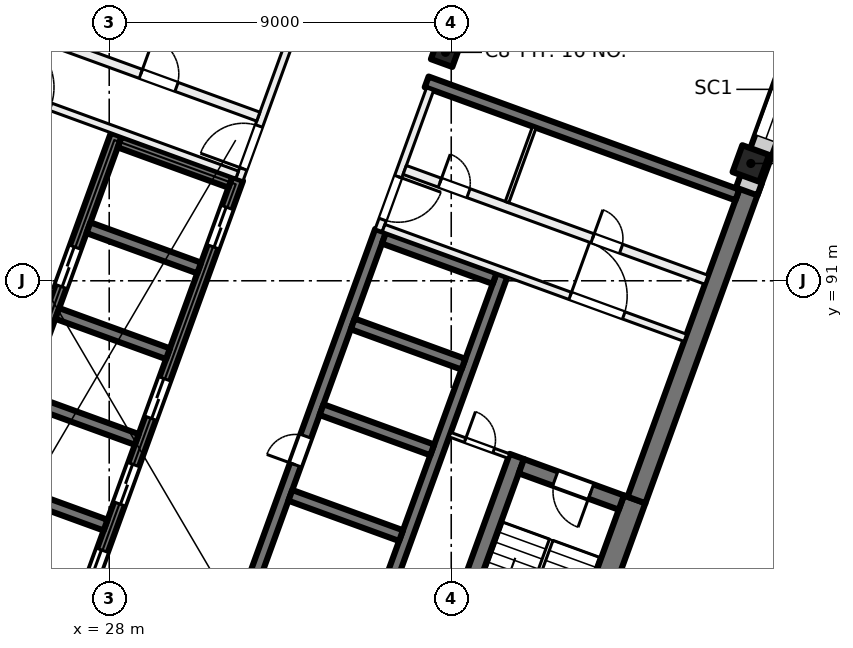
"""IFC4 building model, lengths in metres.
Left out: names, types, materials, properties, quantities, classifications, styles, units other than length and angle.
Written with IfcOpenShell. Run it as: python <this file> out.ifc"""

import sys

from ifc_helpers import new_model, si_unit, direction, frame, frame_2d, origin, origin_2d, place, context, subcontext, project, spatial, rectangle, extrude, element, fill, save


model = new_model("IFC4")
c1 = context("Model", 3, precision=1e-05, world=origin(), true_north=direction((0.0, 1.0)))
c2 = subcontext(c1, "Body", "Model", "MODEL_VIEW")
j1 = project(units=[si_unit("LENGTHUNIT", "METRE"), si_unit("PLANEANGLEUNIT", "RADIAN")], contexts=[c1])
p1 = place(None, origin())
s1 = spatial("IfcSite", under=j1, at=p1, CompositionType="ELEMENT")
p2 = place(p1, origin())
s2 = spatial("IfcBuilding", under=s1, at=p2, CompositionType="ELEMENT")
p3 = place(p2, frame((0.0, 0.0, 228.0)))
s3 = spatial("IfcBuildingStorey", under=s2, at=p3, CompositionType="ELEMENT", Elevation=228.0)
p4 = place(p3, frame((36.849, 97.011, 0.0), z_axis=(0.0, 0.0, 1.0), x_axis=(-0.342020143326, -0.939692620786, 0.0)))
e1 = element("IfcColumn", 1, at=p4, inside=s3, PredefinedType="COLUMN", context=c2, shape_type="SweptSolid", body=[
    extrude(rectangle(XDim=0.6, YDim=0.6, at=origin_2d()), origin(), (0.0, 0.0, 1.0), 4.0),
])
p5 = place(p3, frame((44.884, 94.087, 0.0), z_axis=(0.0, 0.0, 1.0), x_axis=(-0.342020143326, -0.939692620786, 0.0)))
e2 = element("IfcColumn", 2, at=p5, inside=s3, PredefinedType="COLUMN", context=c2, shape_type="SweptSolid", body=[
    extrude(rectangle(XDim=0.75, YDim=0.75, at=origin_2d()), origin(), (0.0, 0.0, 1.0), 4.0),
])
p6 = place(p3, frame((35.75, 78.788, 0.0), z_axis=(0.0, 0.0, 1.0), x_axis=(-0.939692894512, 0.342019391267, 0.0)))
e3 = element("IfcWall", 3, at=p6, inside=s3, PredefinedType="SHEAR", context=c2, shape_type="SweptSolid", body=[
    extrude(rectangle(XDim=14.4, YDim=0.5, at=frame_2d((7.2, 0.0))), origin(), (0.0, 0.0, 1.0), 4.0),
])
p7 = place(p3, frame((39.159, 77.92, 0.0), z_axis=(0.0, 0.0, 1.0), x_axis=(0.342016982193, 0.939693771338, 0.0)))
e4 = element("IfcWall", 4, at=p7, inside=s3, PredefinedType="SHEAR", context=c2, shape_type="SweptSolid", body=[
    extrude(rectangle(XDim=7.8, YDim=0.6, at=frame_2d((3.9, 0.0))), origin(), (0.0, 0.0, 1.0), 4.0),
])
p8 = place(p3, frame((41.874, 85.232, 0.0), z_axis=(0.0, 0.0, 1.0), x_axis=(0.342020437038, 0.939692513883, 0.0)))
e5 = element("IfcWall", 5, at=p8, inside=s3, PredefinedType="SHEAR", context=c2, shape_type="SweptSolid", body=[
    extrude(rectangle(XDim=8.975, YDim=0.5, at=frame_2d((4.487, 0.0))), origin(), (0.0, 0.0, 1.0), 4.0),
])
p9 = place(p3, frame((36.058, 79.048, 0.0), z_axis=(0.0, 0.0, 1.0), x_axis=(0.342016982193, 0.939693771338, 0.0)))
e6 = element("IfcWall", 6, at=p9, inside=s3, PredefinedType="SHEAR", context=c2, shape_type="SweptSolid", body=[
    extrude(rectangle(XDim=7.8, YDim=0.4, at=frame_2d((3.9, 0.0))), origin(), (0.0, 0.0, 1.0), 4.0),
])
p10 = place(p3, frame((41.476, 85.164, 0.0), z_axis=(0.0, 0.0, 1.0), x_axis=(-0.939678810556, 0.342058084236, 0.0)))
e7 = element("IfcWall", 7, at=p10, inside=s3, PredefinedType="SHEAR", context=c2, shape_type="SweptSolid", body=[
    extrude(rectangle(XDim=2.8, YDim=0.4, at=frame_2d((1.4, 0.0))), origin(), (0.0, 0.0, 1.0), 4.0),
])
p11 = place(p10, frame((0.85, 0.0, 0.0)))
e8 = element("IfcOpeningElement", 8, at=p11, cuts=e7, PredefinedType="OPENING", context=c2, shape_type="SweptSolid", body=[
    extrude(rectangle(XDim=1.0, YDim=2.1, at=frame_2d((0.5, 1.05))), frame((0.0, 0.21, 0.0), z_axis=(0.0, -1.0, 0.0), x_axis=(1.0, 0.0, 0.0)), (0.0, 0.0, 1.0), 0.42),
])
p12 = place(p3, frame((30.949, 80.801, 0.0), z_axis=(0.0, 0.0, 1.0), x_axis=(0.342016684409, 0.939693879721, 0.0)))
e9 = element("IfcWall", 9, at=p12, inside=s3, PredefinedType="SHEAR", context=c2, shape_type="SweptSolid", body=[
    extrude(rectangle(XDim=12.25, YDim=0.3, at=frame_2d((6.125, 0.0))), origin(), (0.0, 0.0, 1.0), 4.0),
])
p13 = place(p12, frame((0.9, 0.0, 0.0)))
e10 = element("IfcOpeningElement", 10, at=p13, cuts=e9, PredefinedType="OPENING", context=c2, shape_type="SweptSolid", body=[
    extrude(rectangle(XDim=0.8, YDim=2.1, at=frame_2d((0.4, 1.05))), frame((0.0, 0.16, 0.0), z_axis=(0.0, -1.0, 0.0), x_axis=(1.0, 0.0, 0.0)), (0.0, 0.0, 1.0), 0.32),
])
p14 = place(p12, frame((5.7, 0.0, 0.0)))
e11 = element("IfcOpeningElement", 11, at=p14, cuts=e9, PredefinedType="OPENING", context=c2, shape_type="SweptSolid", body=[
    extrude(rectangle(XDim=0.8, YDim=2.1, at=frame_2d((0.4, 1.05))), frame((0.0, 0.16, 0.0), z_axis=(0.0, -1.0, 0.0), x_axis=(1.0, 0.0, 0.0)), (0.0, 0.0, 1.0), 0.32),
])
p15 = place(p3, frame((34.144, 79.638, 0.0), z_axis=(0.0, 0.0, 1.0), x_axis=(0.342016684409, 0.939693879721, 0.0)))
e12 = element("IfcWall", 12, at=p15, inside=s3, PredefinedType="SHEAR", context=c2, shape_type="SweptSolid", body=[
    extrude(rectangle(XDim=12.25, YDim=0.3, at=frame_2d((6.125, 0.0))), origin(), (0.0, 0.0, 1.0), 4.0),
])
p16 = place(p3, frame((35.679, 84.294, 0.0), z_axis=(0.0, 0.0, 1.0), x_axis=(-0.939706007505, 0.341983361377, 0.0)))
e13 = element("IfcWall", 13, at=p16, inside=s3, PredefinedType="SHEAR", context=c2, shape_type="SweptSolid", body=[
    extrude(rectangle(XDim=3.1, YDim=0.3, at=frame_2d((1.55, 0.0))), origin(), (0.0, 0.0, 1.0), 4.0),
])
for number, where, z_axis, x_axis in (
    (14, (36.5, 86.549, 0.0), (0.0, 0.0, 1.0), (-0.94, 0.342, 0.0)),
    (15, (37.321, 88.805, 0.0), (0.0, 0.0, 1.0), (-0.94, 0.342, 0.0)),
    (16, (38.142, 91.06, 0.0), (0.0, 0.0, 1.0), (-0.94, 0.342, 0.0)),
):
    element("IfcWall", number, at=place(p3, frame(where, z_axis=z_axis, x_axis=x_axis)), inside=s3, PredefinedType="SHEAR", context=c2, shape_type="SweptSolid", body=[
        extrude(rectangle(XDim=3.1, YDim=0.3, at=frame_2d((1.55, 0.0))), origin(), (0.0, 0.0, 1.0), 4.0),
    ])
p17 = place(p3, frame((27.191, 82.169, 0.0), z_axis=(0.0, 0.0, 1.0), x_axis=(0.342016684409, 0.939693879721, 0.0)))
e17 = element("IfcWall", 17, at=p17, inside=s3, PredefinedType="SHEAR", context=c2, shape_type="SweptSolid", body=[
    extrude(rectangle(XDim=12.25, YDim=0.3, at=frame_2d((6.125, 0.0))), origin(), (0.0, 0.0, 1.0), 4.0),
])
p18 = place(p17, frame((0.75, 0.0, 0.0)))
e18 = element("IfcOpeningElement", 18, at=p18, cuts=e17, PredefinedType="OPENING", context=c2, shape_type="SweptSolid", body=[
    extrude(rectangle(XDim=1.1, YDim=2.1, at=frame_2d((0.55, 1.05))), frame((0.0, 0.16, 0.0), z_axis=(0.0, -1.0, 0.0), x_axis=(1.0, 0.0, 0.0)), (0.0, 0.0, 1.0), 0.32),
])
p19 = place(p17, frame((3.15, 0.0, 0.0)))
e19 = element("IfcOpeningElement", 19, at=p19, cuts=e17, PredefinedType="OPENING", context=c2, shape_type="SweptSolid", body=[
    extrude(rectangle(XDim=1.1, YDim=2.1, at=frame_2d((0.55, 1.05))), frame((0.0, 0.16, 0.0), z_axis=(0.0, -1.0, 0.0), x_axis=(1.0, 0.0, 0.0)), (0.0, 0.0, 1.0), 0.32),
])
p20 = place(p17, frame((5.55, 0.0, 0.0)))
e20 = element("IfcOpeningElement", 20, at=p20, cuts=e17, PredefinedType="OPENING", context=c2, shape_type="SweptSolid", body=[
    extrude(rectangle(XDim=1.1, YDim=2.1, at=frame_2d((0.55, 1.05))), frame((0.0, 0.16, 0.0), z_axis=(0.0, -1.0, 0.0), x_axis=(1.0, 0.0, 0.0)), (0.0, 0.0, 1.0), 0.32),
])
p21 = place(p17, frame((10.35, 0.0, 0.0)))
e21 = element("IfcOpeningElement", 21, at=p21, cuts=e17, PredefinedType="OPENING", context=c2, shape_type="SweptSolid", body=[
    extrude(rectangle(XDim=1.1, YDim=2.1, at=frame_2d((0.55, 1.05))), frame((0.0, 0.16, 0.0), z_axis=(0.0, -1.0, 0.0), x_axis=(1.0, 0.0, 0.0)), (0.0, 0.0, 1.0), 0.32),
])
p22 = place(p3, frame((23.996, 83.332, 0.0), z_axis=(0.0, 0.0, 1.0), x_axis=(0.342016684409, 0.939693879721, 0.0)))
e22 = element("IfcWall", 22, at=p22, inside=s3, PredefinedType="SHEAR", context=c2, shape_type="SweptSolid", body=[
    extrude(rectangle(XDim=12.25, YDim=0.3, at=frame_2d((6.125, 0.0))), origin(), (0.0, 0.0, 1.0), 4.0),
])
p23 = place(p22, frame((8.0, 0.0, 0.0)))
e23 = element("IfcOpeningElement", 23, at=p23, cuts=e22, PredefinedType="OPENING", context=c2, shape_type="SweptSolid", body=[
    extrude(rectangle(XDim=1.1, YDim=2.1, at=frame_2d((0.55, 1.05))), frame((0.0, 0.16, 0.0), z_axis=(0.0, -1.0, 0.0), x_axis=(1.0, 0.0, 0.0)), (0.0, 0.0, 1.0), 0.32),
])
for number, where, z_axis, x_axis in (
    (24, (27.905, 84.57, 0.0), (0.0, 0.0, 1.0), (-0.94, 0.342, 0.0)),
    (25, (28.726, 86.825, 0.0), (0.0, 0.0, 1.0), (-0.94, 0.342, 0.0)),
    (26, (29.546, 89.08, 0.0), (0.0, 0.0, 1.0), (-0.94, 0.342, 0.0)),
):
    element("IfcWall", number, at=place(p3, frame(where, z_axis=z_axis, x_axis=x_axis)), inside=s3, PredefinedType="SHEAR", context=c2, shape_type="SweptSolid", body=[
        extrude(rectangle(XDim=3.1, YDim=0.3, at=frame_2d((1.55, 0.0))), origin(), (0.0, 0.0, 1.0), 4.0),
    ])
for number, where, z_axis, x_axis in (
    (27, (30.367, 91.336, 0.0), (0.0, 0.0, 1.0), (-0.94, 0.342, 0.0)),
    (28, (31.188, 93.591, 0.0), (0.0, 0.0, 1.0), (-0.94, 0.342, 0.0)),
):
    element("IfcWall", number, at=place(p3, frame(where, z_axis=z_axis, x_axis=x_axis)), inside=s3, PredefinedType="SHEAR", context=c2, shape_type="SweptSolid", body=[
        extrude(rectangle(XDim=3.1, YDim=0.3, at=frame_2d((1.55, 0.0))), origin(), (0.0, 0.0, 1.0), 4.0),
    ])
p24 = place(p3, frame((44.529, 93.258, 0.0), z_axis=(0.0, 0.0, 1.0), x_axis=(-0.9396917844, 0.342022441267, 0.0)))
e29 = element("IfcWall", 29, at=p24, inside=s3, PredefinedType="SHEAR", context=c2, shape_type="SweptSolid", body=[
    extrude(rectangle(XDim=8.7, YDim=0.3, at=frame_2d((4.35, 0.0))), origin(), (0.0, 0.0, 1.0), 4.0),
])
p25 = place(p3, frame((52.212, 113.783, 0.0), z_axis=(0.0, 0.0, 1.0), x_axis=(-0.34202521188, -0.939690775968, 0.0)))
e30 = element("IfcWall", 30, at=p25, inside=s3, PredefinedType="SOLIDWALL", context=c2, shape_type="SweptSolid", body=[
    extrude(rectangle(XDim=21.745, YDim=0.6, at=frame_2d((10.873, 0.0))), origin(), (0.0, 0.0, 1.0), 3.625),
])
p26 = place(p25, frame((4.365, 0.0, 0.0)))
e31 = element("IfcOpeningElement", 31, at=p26, cuts=e30, PredefinedType="OPENING", context=c2, shape_type="SweptSolid", body=[
    extrude(rectangle(XDim=1.8, YDim=2.4, at=frame_2d((0.9, 1.2))), frame((0.0, 0.31, 0.0), z_axis=(0.0, -1.0, 0.0), x_axis=(1.0, 0.0, 0.0)), (0.0, 0.0, 1.0), 0.62),
])
p27 = place(p25, frame((8.265, 0.0, 0.9)))
e32 = element("IfcOpeningElement", 32, at=p27, cuts=e30, PredefinedType="OPENING", context=c2, shape_type="SweptSolid", body=[
    extrude(rectangle(XDim=3.0, YDim=2.4, at=frame_2d((1.5, 1.2))), frame((0.0, 0.31, 0.0), z_axis=(0.0, -1.0, 0.0), x_axis=(1.0, 0.0, 0.0)), (0.0, 0.0, 1.0), 0.62),
])
p28 = place(p25, frame((12.765, 0.0, 0.9)))
e33 = element("IfcOpeningElement", 33, at=p28, cuts=e30, PredefinedType="OPENING", context=c2, shape_type="SweptSolid", body=[
    extrude(rectangle(XDim=3.0, YDim=2.4, at=frame_2d((1.5, 1.2))), frame((0.0, 0.31, 0.0), z_axis=(0.0, -1.0, 0.0), x_axis=(1.0, 0.0, 0.0)), (0.0, 0.0, 1.0), 0.62),
])
p29 = place(p25, frame((17.265, 0.0, 0.9)))
e34 = element("IfcOpeningElement", 34, at=p29, cuts=e30, PredefinedType="OPENING", context=c2, shape_type="SweptSolid", body=[
    extrude(rectangle(XDim=3.0, YDim=2.4, at=frame_2d((1.5, 1.2))), frame((0.0, 0.31, 0.0), z_axis=(0.0, -1.0, 0.0), x_axis=(1.0, 0.0, 0.0)), (0.0, 0.0, 1.0), 0.62),
])
p30 = place(p3, frame((31.427, 93.663, 0.0), z_axis=(0.0, 0.0, 1.0), x_axis=(0.342030870568, 0.93968871632, 0.0)))
e35 = element("IfcWall", 35, at=p30, inside=s3, PredefinedType="PARTITIONING", context=c2, shape_type="SweptSolid", body=[
    extrude(rectangle(XDim=3.95, YDim=0.2, at=frame_2d((1.975, 0.0))), origin(), (0.0, 0.0, 1.0), 3.625),
])
p31 = place(p30, frame((0.3, 0.0, 0.0)))
e36 = element("IfcOpeningElement", 36, at=p31, cuts=e35, PredefinedType="OPENING", context=c2, shape_type="SweptSolid", body=[
    extrude(rectangle(XDim=1.2, YDim=2.1, at=frame_2d((0.6, 1.05))), frame((0.0, 0.11, 0.0), z_axis=(0.0, -1.0, 0.0), x_axis=(1.0, 0.0, 0.0)), (0.0, 0.0, 1.0), 0.22),
])
p32 = place(p3, frame((23.427, 96.682, 0.0), z_axis=(0.0, 0.0, 1.0), x_axis=(0.939690465531, -0.342026064782, 0.0)))
e37 = element("IfcWall", 37, at=p32, inside=s3, PredefinedType="PARTITIONING", context=c2, shape_type="SweptSolid", body=[
    extrude(rectangle(XDim=8.45, YDim=0.2, at=frame_2d((4.225, 0.0))), origin(), (0.0, 0.0, 1.0), 3.625),
])
p33 = place(p32, frame((1.725, 0.0, 0.0)))
e38 = element("IfcOpeningElement", 38, at=p33, cuts=e37, PredefinedType="OPENING", context=c2, shape_type="SweptSolid", body=[
    extrude(rectangle(XDim=1.5, YDim=2.1, at=frame_2d((0.75, 1.05))), frame((0.0, 0.11, 0.0), z_axis=(0.0, -1.0, 0.0), x_axis=(1.0, 0.0, 0.0)), (0.0, 0.0, 1.0), 0.22),
])
p34 = place(p3, frame((23.983, 98.208, 0.0), z_axis=(0.0, 0.0, 1.0), x_axis=(0.939699751196, -0.342000552051, 0.0)))
e39 = element("IfcWall", 39, at=p34, inside=s3, PredefinedType="PARTITIONING", context=c2, shape_type="SweptSolid", body=[
    extrude(rectangle(XDim=8.45, YDim=0.25, at=frame_2d((4.225, 0.0))), origin(), (0.0, 0.0, 1.0), 3.625),
])
p35 = place(p34, frame((5.16, 0.0, 0.0)))
e40 = element("IfcOpeningElement", 40, at=p35, cuts=e39, PredefinedType="OPENING", context=c2, shape_type="SweptSolid", body=[
    extrude(rectangle(XDim=1.0, YDim=2.1, at=frame_2d((0.5, 1.05))), frame((0.0, 0.135, 0.0), z_axis=(0.0, -1.0, 0.0), x_axis=(1.0, 0.0, 0.0)), (0.0, 0.0, 1.0), 0.27),
])
p36 = place(p34, frame((0.885, 0.0, 0.0)))
e41 = element("IfcOpeningElement", 41, at=p36, cuts=e39, PredefinedType="OPENING", context=c2, shape_type="SweptSolid", body=[
    extrude(rectangle(XDim=1.0, YDim=2.1, at=frame_2d((0.5, 1.05))), frame((0.0, 0.135, 0.0), z_axis=(0.0, -1.0, 0.0), x_axis=(1.0, 0.0, 0.0)), (0.0, 0.0, 1.0), 0.27),
])
p37 = place(p3, frame((24.985, 91.312, 0.0), z_axis=(0.0, 0.0, 1.0), x_axis=(0.939719959755, -0.341945020783, 0.0)))
e42 = element("IfcWall", 42, at=p37, inside=s3, PredefinedType="PARTITIONING", context=c2, shape_type="SweptSolid", body=[
    extrude(rectangle(XDim=1.65, YDim=0.125, at=frame_2d((0.825, 0.0))), origin(), (0.0, 0.0, 1.0), 3.625),
])
p38 = place(p37, frame((0.425, 0.0, 0.0)))
e43 = element("IfcOpeningElement", 43, at=p38, cuts=e42, PredefinedType="OPENING", context=c2, shape_type="SweptSolid", body=[
    extrude(rectangle(XDim=0.8, YDim=2.1, at=frame_2d((0.4, 1.05))), frame((0.0, 0.073, 0.0), z_axis=(0.0, -1.0, 0.0), x_axis=(1.0, 0.0, 0.0)), (0.0, 0.0, 1.0), 0.145),
])
p39 = place(p3, frame((36.443, 96.041, 0.0), z_axis=(0.0, 0.0, 1.0), x_axis=(-0.341996156931, -0.939701350773, 0.0)))
e44 = element("IfcWall", 44, at=p39, inside=s3, PredefinedType="PARTITIONING", context=c2, shape_type="SweptSolid", body=[
    extrude(rectangle(XDim=3.95, YDim=0.2, at=frame_2d((1.975, 0.0))), origin(), (0.0, 0.0, 1.0), 3.625),
])
p40 = place(p39, frame((2.45, 0.0, 0.0)))
e45 = element("IfcOpeningElement", 45, at=p40, cuts=e44, PredefinedType="OPENING", context=c2, shape_type="SweptSolid", body=[
    extrude(rectangle(XDim=1.2, YDim=2.1, at=frame_2d((0.6, 1.05))), frame((0.0, 0.11, 0.0), z_axis=(0.0, -1.0, 0.0), x_axis=(1.0, 0.0, 0.0)), (0.0, 0.0, 1.0), 0.22),
])
p41 = place(p3, frame((35.22, 92.389, 0.0), z_axis=(0.0, 0.0, 1.0), x_axis=(0.939690465531, -0.342026064782, 0.0)))
e46 = element("IfcWall", 46, at=p41, inside=s3, PredefinedType="PARTITIONING", context=c2, shape_type="SweptSolid", body=[
    extrude(rectangle(XDim=8.45, YDim=0.2, at=frame_2d((4.225, 0.0))), origin(), (0.0, 0.0, 1.0), 3.625),
])
p42 = place(p41, frame((5.225, 0.0, 0.0)))
e47 = element("IfcOpeningElement", 47, at=p42, cuts=e46, PredefinedType="OPENING", context=c2, shape_type="SweptSolid", body=[
    extrude(rectangle(XDim=1.5, YDim=2.1, at=frame_2d((0.75, 1.05))), frame((0.0, 0.11, 0.0), z_axis=(0.0, -1.0, 0.0), x_axis=(1.0, 0.0, 0.0)), (0.0, 0.0, 1.0), 0.22),
])
p43 = place(p3, frame((35.776, 93.916, 0.0), z_axis=(0.0, 0.0, 1.0), x_axis=(0.939690465531, -0.342026064782, 0.0)))
e48 = element("IfcWall", 48, at=p43, inside=s3, PredefinedType="PARTITIONING", context=c2, shape_type="SweptSolid", body=[
    extrude(rectangle(XDim=8.45, YDim=0.25, at=frame_2d((4.225, 0.0))), origin(), (0.0, 0.0, 1.0), 3.625),
])
p44 = place(p43, frame((0.985, 0.0, 0.0)))
e49 = element("IfcOpeningElement", 49, at=p44, cuts=e48, PredefinedType="OPENING", context=c2, shape_type="SweptSolid", body=[
    extrude(rectangle(XDim=0.8, YDim=2.1, at=frame_2d((0.4, 1.05))), frame((0.0, 0.135, 0.0), z_axis=(0.0, -1.0, 0.0), x_axis=(1.0, 0.0, 0.0)), (0.0, 0.0, 1.0), 0.27),
])
p45 = place(p43, frame((5.26, 0.0, 0.0)))
e50 = element("IfcOpeningElement", 50, at=p45, cuts=e48, PredefinedType="OPENING", context=c2, shape_type="SweptSolid", body=[
    extrude(rectangle(XDim=0.8, YDim=2.1, at=frame_2d((0.4, 1.05))), frame((0.0, 0.135, 0.0), z_axis=(0.0, -1.0, 0.0), x_axis=(1.0, 0.0, 0.0)), (0.0, 0.0, 1.0), 0.27),
])
p46 = place(p3, frame((36.966, 86.952, 0.0), z_axis=(0.0, 0.0, 1.0), x_axis=(0.939672407396, -0.342075674051, 0.0)))
e51 = element("IfcWall", 51, at=p46, inside=s3, PredefinedType="PARTITIONING", context=c2, shape_type="SweptSolid", body=[
    extrude(rectangle(XDim=1.65, YDim=0.125, at=frame_2d((0.825, 0.0))), origin(), (0.0, 0.0, 1.0), 3.625),
])
p47 = place(p46, frame((0.425, 0.0, 0.0)))
e52 = element("IfcOpeningElement", 52, at=p47, cuts=e51, PredefinedType="OPENING", context=c2, shape_type="SweptSolid", body=[
    extrude(rectangle(XDim=0.8, YDim=2.1, at=frame_2d((0.4, 1.05))), frame((0.0, 0.073, 0.0), z_axis=(0.0, -1.0, 0.0), x_axis=(1.0, 0.0, 0.0)), (0.0, 0.0, 1.0), 0.145),
])
p48 = place(p3, frame((39.187, 95.042, 0.0), z_axis=(0.0, 0.0, 1.0), x_axis=(-0.342023078919, -0.939691552312, 0.0)))
e53 = element("IfcWall", 53, at=p48, inside=s3, PredefinedType="PARTITIONING", context=c2, shape_type="SweptSolid", body=[
    extrude(rectangle(XDim=2.1, YDim=0.1, at=frame_2d((1.05, 0.0))), origin(), (0.0, 0.0, 1.0), 3.625),
])
p49 = place(p29, origin())
e54 = element("IfcWindow", 54, at=p49, inside=s3, PartitioningType="SINGLE_PANEL", PredefinedType="WINDOW", context=c2, shape_type="SweptSolid", body=[
    extrude(rectangle(XDim=3.0, YDim=2.4, at=frame_2d((1.5, 1.2))), frame((0.0, 0.03, 0.0), z_axis=(0.0, -1.0, 0.0), x_axis=(1.0, 0.0, 0.0)), (0.0, 0.0, 1.0), 0.06),
])
fill(e34, e54)
p50 = place(p18, origin())
e55 = element("IfcDoor", 55, at=p50, inside=s3, OperationType="DOUBLE_DOOR_SLIDING", PredefinedType="DOOR", context=c2, shape_type="SweptSolid", body=[
    extrude(rectangle(XDim=1.1, YDim=2.1, at=frame_2d((0.55, 1.05))), frame((0.0, 0.025, 0.0), z_axis=(0.0, -1.0, 0.0), x_axis=(1.0, 0.0, 0.0)), (0.0, 0.0, 1.0), 0.05),
])
fill(e18, e55)
p51 = place(p19, origin())
e56 = element("IfcDoor", 56, at=p51, inside=s3, OperationType="DOUBLE_DOOR_SLIDING", PredefinedType="DOOR", context=c2, shape_type="SweptSolid", body=[
    extrude(rectangle(XDim=1.1, YDim=2.1, at=frame_2d((0.55, 1.05))), frame((0.0, 0.025, 0.0), z_axis=(0.0, -1.0, 0.0), x_axis=(1.0, 0.0, 0.0)), (0.0, 0.0, 1.0), 0.05),
])
fill(e19, e56)
p52 = place(p20, origin())
e57 = element("IfcDoor", 57, at=p52, inside=s3, OperationType="DOUBLE_DOOR_SLIDING", PredefinedType="DOOR", context=c2, shape_type="SweptSolid", body=[
    extrude(rectangle(XDim=1.1, YDim=2.1, at=frame_2d((0.55, 1.05))), frame((0.0, 0.025, 0.0), z_axis=(0.0, -1.0, 0.0), x_axis=(1.0, 0.0, 0.0)), (0.0, 0.0, 1.0), 0.05),
])
fill(e20, e57)
p53 = place(p21, origin())
e58 = element("IfcDoor", 58, at=p53, inside=s3, OperationType="DOUBLE_DOOR_SLIDING", PredefinedType="DOOR", context=c2, shape_type="SweptSolid", body=[
    extrude(rectangle(XDim=1.1, YDim=2.1, at=frame_2d((0.55, 1.05))), frame((0.0, 0.025, 0.0), z_axis=(0.0, -1.0, 0.0), x_axis=(1.0, 0.0, 0.0)), (0.0, 0.0, 1.0), 0.05),
])
fill(e21, e58)
p54 = place(p14, origin())
e59 = element("IfcDoor", 59, at=p54, inside=s3, OperationType="SINGLE_SWING_RIGHT", PredefinedType="DOOR", context=c2, shape_type="SweptSolid", body=[
    extrude(rectangle(XDim=0.8, YDim=2.1, at=frame_2d((0.4, 1.05))), frame((0.0, 0.025, 0.0), z_axis=(0.0, -1.0, 0.0), x_axis=(1.0, 0.0, 0.0)), (0.0, 0.0, 1.0), 0.05),
])
fill(e11, e59)
p55 = place(p31, origin())
e60 = element("IfcDoor", 60, at=p55, inside=s3, OperationType="DOUBLE_DOOR_SINGLE_SWING", PredefinedType="DOOR", context=c2, shape_type="SweptSolid", body=[
    extrude(rectangle(XDim=1.2, YDim=2.1, at=frame_2d((0.6, 1.05))), frame((0.0, 0.025, 0.0), z_axis=(0.0, -1.0, 0.0), x_axis=(1.0, 0.0, 0.0)), (0.0, 0.0, 1.0), 0.05),
])
fill(e36, e60)
p56 = place(p35, origin())
e61 = element("IfcDoor", 61, at=p56, inside=s3, OperationType="SINGLE_SWING_LEFT", PredefinedType="DOOR", context=c2, shape_type="SweptSolid", body=[
    extrude(rectangle(XDim=1.0, YDim=2.1, at=frame_2d((0.5, 1.05))), frame((0.0, 0.025, 0.0), z_axis=(0.0, -1.0, 0.0), x_axis=(1.0, 0.0, 0.0)), (0.0, 0.0, 1.0), 0.05),
])
fill(e40, e61)
p57 = place(p40, origin())
e62 = element("IfcDoor", 62, at=p57, inside=s3, OperationType="DOUBLE_DOOR_SINGLE_SWING", PredefinedType="DOOR", context=c2, shape_type="SweptSolid", body=[
    extrude(rectangle(XDim=1.2, YDim=2.1, at=frame_2d((0.6, 1.05))), frame((0.0, 0.025, 0.0), z_axis=(0.0, -1.0, 0.0), x_axis=(1.0, 0.0, 0.0)), (0.0, 0.0, 1.0), 0.05),
])
fill(e45, e62)
p58 = place(p42, origin())
e63 = element("IfcDoor", 63, at=p58, inside=s3, OperationType="DOUBLE_DOOR_SINGLE_SWING", PredefinedType="DOOR", context=c2, shape_type="SweptSolid", body=[
    extrude(rectangle(XDim=1.5, YDim=2.1, at=frame_2d((0.75, 1.05))), frame((0.0, 0.025, 0.0), z_axis=(0.0, -1.0, 0.0), x_axis=(1.0, 0.0, 0.0)), (0.0, 0.0, 1.0), 0.05),
])
fill(e47, e63)
p59 = place(p11, origin())
e64 = element("IfcDoor", 64, at=p59, inside=s3, OperationType="SINGLE_SWING_RIGHT", PredefinedType="DOOR", context=c2, shape_type="SweptSolid", body=[
    extrude(rectangle(XDim=1.0, YDim=2.1, at=frame_2d((0.5, 1.05))), frame((0.0, 0.025, 0.0), z_axis=(0.0, -1.0, 0.0), x_axis=(1.0, 0.0, 0.0)), (0.0, 0.0, 1.0), 0.05),
])
fill(e8, e64)
p60 = place(p47, origin())
e65 = element("IfcDoor", 65, at=p60, inside=s3, OperationType="SINGLE_SWING_LEFT", PredefinedType="DOOR", context=c2, shape_type="SweptSolid", body=[
    extrude(rectangle(XDim=0.8, YDim=2.1, at=frame_2d((0.4, 1.05))), frame((0.0, 0.025, 0.0), z_axis=(0.0, -1.0, 0.0), x_axis=(1.0, 0.0, 0.0)), (0.0, 0.0, 1.0), 0.05),
])
fill(e52, e65)
p61 = place(p44, origin())
e66 = element("IfcDoor", 66, at=p61, inside=s3, OperationType="SINGLE_SWING_RIGHT", PredefinedType="DOOR", context=c2, shape_type="SweptSolid", body=[
    extrude(rectangle(XDim=0.8, YDim=2.1, at=frame_2d((0.4, 1.05))), frame((0.0, 0.025, 0.0), z_axis=(0.0, -1.0, 0.0), x_axis=(1.0, 0.0, 0.0)), (0.0, 0.0, 1.0), 0.05),
])
fill(e49, e66)
p62 = place(p45, origin())
e67 = element("IfcDoor", 67, at=p62, inside=s3, OperationType="SINGLE_SWING_LEFT", PredefinedType="DOOR", context=c2, shape_type="SweptSolid", body=[
    extrude(rectangle(XDim=0.8, YDim=2.1, at=frame_2d((0.4, 1.05))), frame((0.0, 0.025, 0.0), z_axis=(0.0, -1.0, 0.0), x_axis=(1.0, 0.0, 0.0)), (0.0, 0.0, 1.0), 0.05),
])
fill(e50, e67)
p63 = place(p23, origin())
e68 = element("IfcDoor", 68, at=p63, inside=s3, OperationType="DOUBLE_DOOR_SLIDING", PredefinedType="DOOR", context=c2, shape_type="SweptSolid", body=[
    extrude(rectangle(XDim=1.1, YDim=2.1, at=frame_2d((0.55, 1.05))), frame((0.0, 0.025, 0.0), z_axis=(0.0, -1.0, 0.0), x_axis=(1.0, 0.0, 0.0)), (0.0, 0.0, 1.0), 0.05),
])
fill(e23, e68)
save(model, sys.argv[1])
